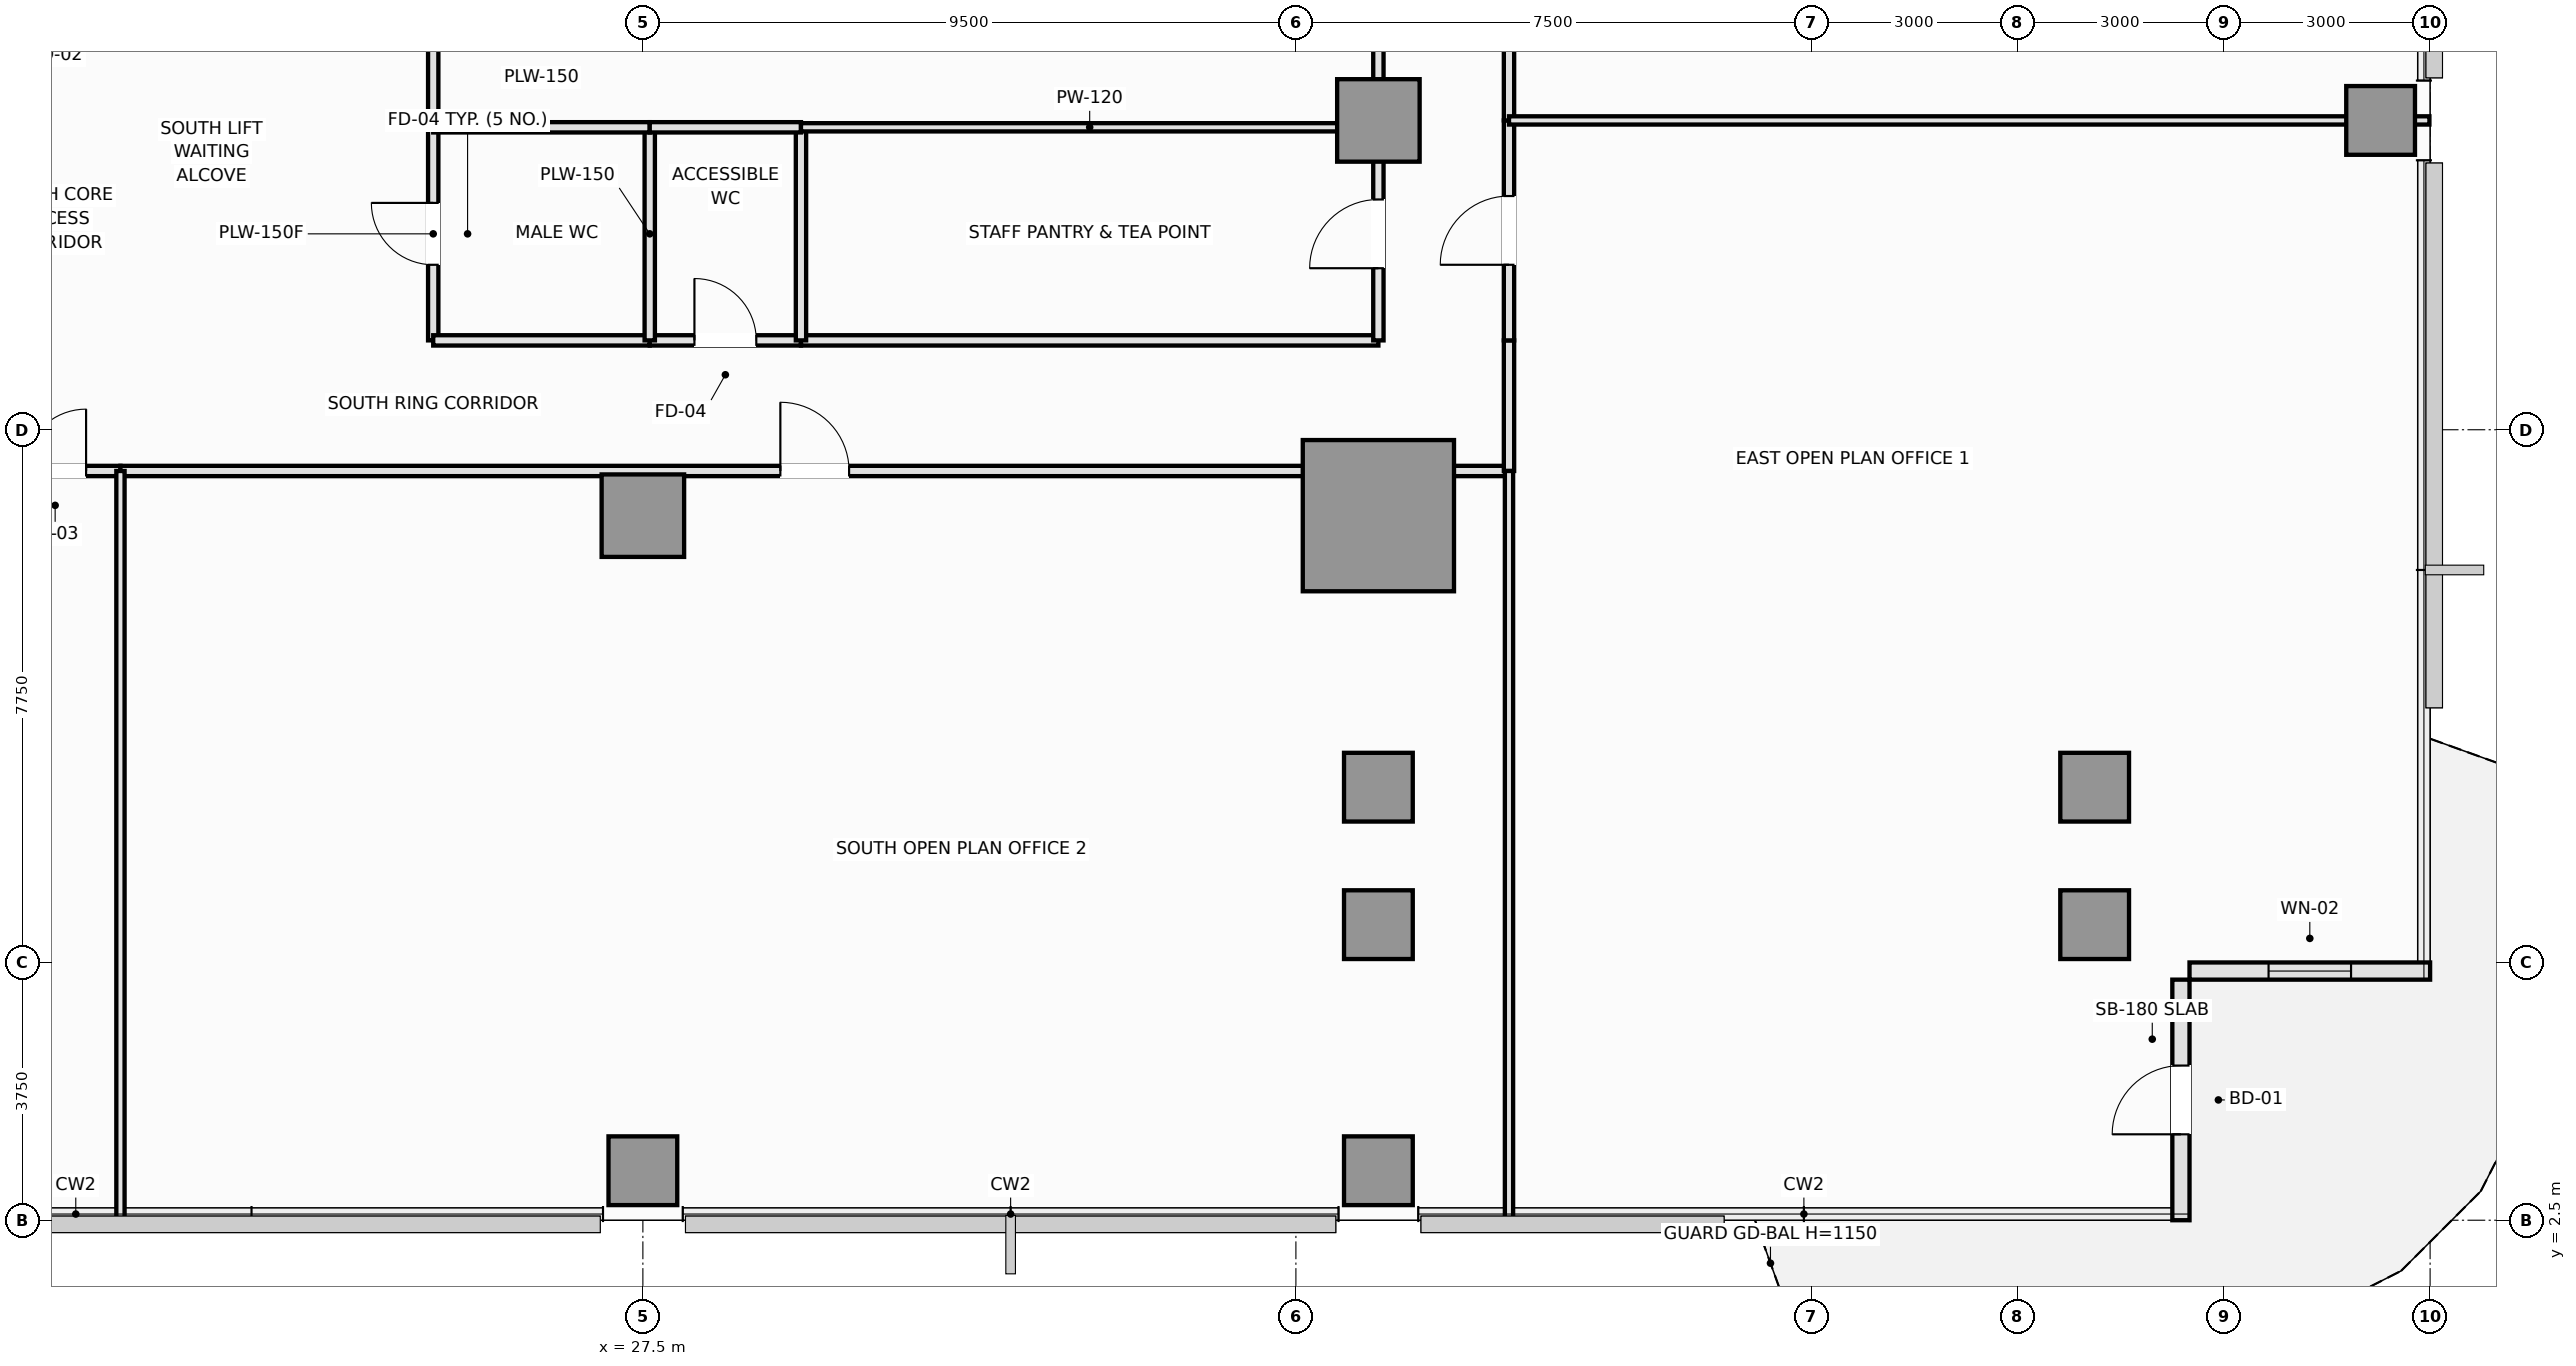
"""IFC4 building model, lengths in metres.
Left out: names, types, materials, properties, quantities, classifications, styles, units other than length and angle.
Written with IfcOpenShell. Run it as: python <this file> out.ifc"""

import sys

from ifc_helpers import new_model, si_unit, direction, frame, frame_2d, origin, origin_2d, place, context, subcontext, project, spatial, rectangle, extrude, element, fill, save


model = new_model("IFC4")
c1 = context("Model", 3, precision=1e-05, world=origin(), true_north=direction((0.0, 1.0)))
c2 = subcontext(c1, "Body", "Model", "MODEL_VIEW")
j1 = project(units=[si_unit("LENGTHUNIT", "METRE"), si_unit("PLANEANGLEUNIT", "RADIAN")], contexts=[c1])
p1 = place(None, origin())
s1 = spatial("IfcSite", under=j1, at=p1, CompositionType="ELEMENT")
p2 = place(p1, origin())
s2 = spatial("IfcBuilding", under=s1, at=p2, CompositionType="ELEMENT")
p3 = place(p2, frame((0.0, 0.0, 54.0)))
s3 = spatial("IfcBuildingStorey", under=s2, at=p3, CompositionType="ELEMENT", Elevation=54.0)
p4 = place(p3, frame((38.2, 12.75, 0.0), z_axis=(0.0, 0.0, 1.0), x_axis=(1.0, 0.0, 0.0)))
e1 = element("IfcColumn", 1, at=p4, inside=s3, PredefinedType="COLUMN", context=c2, shape_type="SweptSolid", body=[
    extrude(rectangle(XDim=2.2, YDim=2.2, at=origin_2d()), origin(), (0.0, 0.0, 1.0), 3.55),
])
for number, where, z_axis, x_axis in (
    (2, (27.5, 12.75, 0.0), (0.0, 0.0, 1.0), (1.0, 0.0, 0.0)),
    (3, (38.2, 18.5, 0.0), (0.0, 0.0, 1.0), (1.0, 0.0, 0.0)),
):
    element("IfcColumn", number, at=place(p3, frame(where, z_axis=z_axis, x_axis=x_axis)), inside=s3, PredefinedType="COLUMN", context=c2, shape_type="SweptSolid", body=[
        extrude(rectangle(XDim=1.2, YDim=1.2, at=origin_2d()), origin(), (0.0, 0.0, 1.0), 3.55),
    ])
for number, where, z_axis, x_axis in (
    (4, (48.62, 6.8, 0.0), (0.0, 0.0, 1.0), (1.0, 0.0, 0.0)),
    (5, (38.2, 6.8, 0.0), (0.0, 0.0, 1.0), (1.0, 0.0, 0.0)),
    (6, (38.2, 8.8, 0.0), (0.0, 0.0, 1.0), (1.0, 0.0, 0.0)),
    (7, (48.62, 8.8, 0.0), (0.0, 0.0, 1.0), (1.0, 0.0, 0.0)),
    (8, (52.78, 18.5, 0.0), (0.0, 0.0, 1.0), (1.0, 0.0, 0.0)),
    (9, (27.5, 3.22, 0.0), (0.0, 0.0, 1.0), (1.0, 0.0, 0.0)),
    (10, (38.2, 3.22, 0.0), (0.0, 0.0, 1.0), (1.0, 0.0, 0.0)),
):
    element("IfcColumn", number, at=place(p3, frame(where, z_axis=z_axis, x_axis=x_axis)), inside=s3, PredefinedType="COLUMN", context=c2, shape_type="SweptSolid", body=[
        extrude(rectangle(XDim=1.0, YDim=1.0, at=origin_2d()), origin(), (0.0, 0.0, 1.0), 3.55),
    ])
p5 = place(p3, frame((49.875, 2.5, 0.0), z_axis=(0.0, 0.0, 1.0), x_axis=(0.0, 1.0, 0.0)))
e11 = element("IfcWall", 11, at=p5, inside=s3, PredefinedType="SOLIDWALL", context=c2, shape_type="SweptSolid", body=[
    extrude(rectangle(XDim=3.5, YDim=0.25, at=frame_2d((1.75, 0.0))), origin(), (0.0, 0.0, 1.0), 3.07),
])
p6 = place(p5, frame((1.25, 0.0, 0.0)))
e12 = element("IfcOpeningElement", 12, at=p6, cuts=e11, PredefinedType="OPENING", context=c2, shape_type="SweptSolid", body=[
    extrude(rectangle(XDim=1.0, YDim=2.2, at=frame_2d((0.5, 1.1))), frame((0.0, 0.135, 0.0), z_axis=(0.0, -1.0, 0.0), x_axis=(1.0, 0.0, 0.0)), (0.0, 0.0, 1.0), 0.27),
])
p7 = place(p3, frame((50.0, 6.125, 0.0), z_axis=(0.0, 0.0, 1.0), x_axis=(1.0, 0.0, 0.0)))
e13 = element("IfcWall", 13, at=p7, inside=s3, PredefinedType="SOLIDWALL", context=c2, shape_type="SweptSolid", body=[
    extrude(rectangle(XDim=3.5, YDim=0.25, at=frame_2d((1.75, 0.0))), origin(), (0.0, 0.0, 1.0), 3.07),
])
p8 = place(p7, frame((1.15, 0.0, 0.9)))
e14 = element("IfcOpeningElement", 14, at=p8, cuts=e13, PredefinedType="OPENING", context=c2, shape_type="SweptSolid", body=[
    extrude(rectangle(XDim=1.2, YDim=1.8, at=frame_2d((0.6, 0.9))), frame((0.0, 0.135, 0.0), z_axis=(0.0, -1.0, 0.0), x_axis=(1.0, 0.0, 0.0)), (0.0, 0.0, 1.0), 0.27),
])
p9 = place(p3, frame((24.45, 15.3, 0.0), z_axis=(0.0, 0.0, 1.0), x_axis=(0.0, 1.0, 0.0)))
e15 = element("IfcWall", 15, at=p9, inside=s3, PredefinedType="PLUMBINGWALL", context=c2, shape_type="SweptSolid", body=[
    extrude(rectangle(XDim=3.1, YDim=0.15, at=frame_2d((1.55, 0.0))), origin(), (0.0, 0.0, 1.0), 3.37),
])
p10 = place(p9, frame((1.1, 0.0, 0.0)))
e16 = element("IfcOpeningElement", 16, at=p10, cuts=e15, PredefinedType="OPENING", context=c2, shape_type="SweptSolid", body=[
    extrude(rectangle(XDim=0.9, YDim=2.1, at=frame_2d((0.45, 1.05))), frame((0.0, 0.085, 0.0), z_axis=(0.0, -1.0, 0.0), x_axis=(1.0, 0.0, 0.0)), (0.0, 0.0, 1.0), 0.17),
])
p11 = place(p3, frame((24.45, 18.4, 0.0), z_axis=(0.0, 0.0, 1.0), x_axis=(0.0, 1.0, 0.0)))
e17 = element("IfcWall", 17, at=p11, inside=s3, PredefinedType="PARTITIONING", context=c2, shape_type="SweptSolid", body=[
    extrude(rectangle(XDim=6.85, YDim=0.15, at=frame_2d((3.425, 0.0))), origin(), (0.0, 0.0, 1.0), 3.37),
])
p12 = place(p11, frame((2.925, 0.0, 0.0)))
e18 = element("IfcOpeningElement", 18, at=p12, cuts=e17, PredefinedType="OPENING", context=c2, shape_type="SweptSolid", body=[
    extrude(rectangle(XDim=1.0, YDim=2.15, at=frame_2d((0.5, 1.075))), frame((0.0, 0.085, 0.0), z_axis=(0.0, -1.0, 0.0), x_axis=(1.0, 0.0, 0.0)), (0.0, 0.0, 1.0), 0.17),
])
p13 = place(p3, frame((24.45, 15.3, 0.0), z_axis=(0.0, 0.0, 1.0), x_axis=(1.0, 0.0, 0.0)))
e19 = element("IfcWall", 19, at=p13, inside=s3, PredefinedType="PLUMBINGWALL", context=c2, shape_type="SweptSolid", body=[
    extrude(rectangle(XDim=3.15, YDim=0.15, at=frame_2d((1.575, 0.0))), origin(), (0.0, 0.0, 1.0), 3.37),
])
p14 = place(p3, frame((27.6, 15.3, 0.0), z_axis=(0.0, 0.0, 1.0), x_axis=(1.0, 0.0, 0.0)))
e20 = element("IfcWall", 20, at=p14, inside=s3, PredefinedType="PLUMBINGWALL", context=c2, shape_type="SweptSolid", body=[
    extrude(rectangle(XDim=2.2, YDim=0.15, at=frame_2d((1.1, 0.0))), origin(), (0.0, 0.0, 1.0), 3.37),
])
p15 = place(p14, frame((0.65, 0.0, 0.0)))
e21 = element("IfcOpeningElement", 21, at=p15, cuts=e20, PredefinedType="OPENING", context=c2, shape_type="SweptSolid", body=[
    extrude(rectangle(XDim=0.9, YDim=2.1, at=frame_2d((0.45, 1.05))), frame((0.0, 0.085, 0.0), z_axis=(0.0, -1.0, 0.0), x_axis=(1.0, 0.0, 0.0)), (0.0, 0.0, 1.0), 0.17),
])
p16 = place(p3, frame((29.8, 15.3, 0.0), z_axis=(0.0, 0.0, 1.0), x_axis=(1.0, 0.0, 0.0)))
e22 = element("IfcWall", 22, at=p16, inside=s3, PredefinedType="PARTITIONING", context=c2, shape_type="SweptSolid", body=[
    extrude(rectangle(XDim=8.4, YDim=0.15, at=frame_2d((4.2, 0.0))), origin(), (0.0, 0.0, 1.0), 3.37),
])
p17 = place(p3, frame((18.0, 13.4, 0.0), z_axis=(0.0, 0.0, 1.0), x_axis=(1.0, 0.0, 0.0)))
e23 = element("IfcWall", 23, at=p17, inside=s3, PredefinedType="PARTITIONING", context=c2, shape_type="SweptSolid", body=[
    extrude(rectangle(XDim=1.9, YDim=0.15, at=frame_2d((0.95, 0.0))), origin(), (0.0, 0.0, 1.0), 3.37),
])
p18 = place(p17, frame((0.5, 0.0, 0.0)))
e24 = element("IfcOpeningElement", 24, at=p18, cuts=e23, PredefinedType="OPENING", context=c2, shape_type="SweptSolid", body=[
    extrude(rectangle(XDim=0.9, YDim=2.1, at=frame_2d((0.45, 1.05))), frame((0.0, 0.085, 0.0), z_axis=(0.0, -1.0, 0.0), x_axis=(1.0, 0.0, 0.0)), (0.0, 0.0, 1.0), 0.17),
])
p19 = place(p3, frame((19.9, 13.4, 0.0), z_axis=(0.0, 0.0, 1.0), x_axis=(1.0, 0.0, 0.0)))
e25 = element("IfcWall", 25, at=p19, inside=s3, PredefinedType="PARTITIONING", context=c2, shape_type="SweptSolid", body=[
    extrude(rectangle(XDim=20.2, YDim=0.15, at=frame_2d((10.1, 0.0))), origin(), (0.0, 0.0, 1.0), 3.37),
])
p20 = place(p19, frame((9.6, 0.0, 0.0)))
e26 = element("IfcOpeningElement", 26, at=p20, cuts=e25, PredefinedType="OPENING", context=c2, shape_type="SweptSolid", body=[
    extrude(rectangle(XDim=1.0, YDim=2.15, at=frame_2d((0.5, 1.075))), frame((0.0, 0.085, 0.0), z_axis=(0.0, -1.0, 0.0), x_axis=(1.0, 0.0, 0.0)), (0.0, 0.0, 1.0), 0.17),
])
p21 = place(p3, frame((40.1, 13.4, 0.0), z_axis=(0.0, 0.0, 1.0), x_axis=(0.0, 1.0, 0.0)))
e27 = element("IfcWall", 27, at=p21, inside=s3, PredefinedType="PARTITIONING", context=c2, shape_type="SweptSolid", body=[
    extrude(rectangle(XDim=1.9, YDim=0.15, at=frame_2d((0.95, 0.0))), origin(), (0.0, 0.0, 1.0), 3.37),
])
p22 = place(p3, frame((38.2, 15.3, 0.0), z_axis=(0.0, 0.0, 1.0), x_axis=(0.0, 1.0, 0.0)))
e28 = element("IfcWall", 28, at=p22, inside=s3, PredefinedType="PARTITIONING", context=c2, shape_type="SweptSolid", body=[
    extrude(rectangle(XDim=3.1, YDim=0.15, at=frame_2d((1.55, 0.0))), origin(), (0.0, 0.0, 1.0), 2.82),
])
p23 = place(p22, frame((1.05, 0.0, 0.0)))
e29 = element("IfcOpeningElement", 29, at=p23, cuts=e28, PredefinedType="OPENING", context=c2, shape_type="SweptSolid", body=[
    extrude(rectangle(XDim=1.0, YDim=2.15, at=frame_2d((0.5, 1.075))), frame((0.0, 0.085, 0.0), z_axis=(0.0, -1.0, 0.0), x_axis=(1.0, 0.0, 0.0)), (0.0, 0.0, 1.0), 0.17),
])
p24 = place(p3, frame((38.2, 18.4, 0.0), z_axis=(0.0, 0.0, 1.0), x_axis=(0.0, 1.0, 0.0)))
e30 = element("IfcWall", 30, at=p24, inside=s3, PredefinedType="PARTITIONING", context=c2, shape_type="SweptSolid", body=[
    extrude(rectangle(XDim=6.85, YDim=0.15, at=frame_2d((3.425, 0.0))), origin(), (0.0, 0.0, 1.0), 2.82),
])
p25 = place(p3, frame((40.1, 15.3, 0.0), z_axis=(0.0, 0.0, 1.0), x_axis=(0.0, 1.0, 0.0)))
e31 = element("IfcWall", 31, at=p25, inside=s3, PredefinedType="PARTITIONING", context=c2, shape_type="SweptSolid", body=[
    extrude(rectangle(XDim=3.2, YDim=0.15, at=frame_2d((1.6, 0.0))), origin(), (0.0, 0.0, 1.0), 3.37),
])
p26 = place(p25, frame((1.1, 0.0, 0.0)))
e32 = element("IfcOpeningElement", 32, at=p26, cuts=e31, PredefinedType="OPENING", context=c2, shape_type="SweptSolid", body=[
    extrude(rectangle(XDim=1.0, YDim=2.15, at=frame_2d((0.5, 1.075))), frame((0.0, 0.085, 0.0), z_axis=(0.0, -1.0, 0.0), x_axis=(1.0, 0.0, 0.0)), (0.0, 0.0, 1.0), 0.17),
])
p27 = place(p3, frame((40.1, 18.5, 0.0), z_axis=(0.0, 0.0, 1.0), x_axis=(0.0, 1.0, 0.0)))
e33 = element("IfcWall", 33, at=p27, inside=s3, PredefinedType="PARTITIONING", context=c2, shape_type="SweptSolid", body=[
    extrude(rectangle(XDim=13.5, YDim=0.15, at=frame_2d((6.75, 0.0))), origin(), (0.0, 0.0, 1.0), 3.37),
])
p28 = place(p27, frame((4.826, 0.0, 0.0)))
e34 = element("IfcOpeningElement", 34, at=p28, cuts=e33, PredefinedType="OPENING", context=c2, shape_type="SweptSolid", body=[
    extrude(rectangle(XDim=1.0, YDim=2.15, at=frame_2d((0.5, 1.075))), frame((0.0, 0.085, 0.0), z_axis=(0.0, -1.0, 0.0), x_axis=(1.0, 0.0, 0.0)), (0.0, 0.0, 1.0), 0.17),
])
p29 = place(p3, frame((27.6, 15.3, 0.0), z_axis=(0.0, 0.0, 1.0), x_axis=(0.0, 1.0, 0.0)))
e35 = element("IfcWall", 35, at=p29, inside=s3, PredefinedType="PLUMBINGWALL", context=c2, shape_type="SweptSolid", body=[
    extrude(rectangle(XDim=3.1, YDim=0.15, at=frame_2d((1.55, 0.0))), origin(), (0.0, 0.0, 1.0), 3.37),
])
p30 = place(p3, frame((24.45, 18.4, 0.0), z_axis=(0.0, 0.0, 1.0), x_axis=(1.0, 0.0, 0.0)))
e36 = element("IfcWall", 36, at=p30, inside=s3, PredefinedType="PLUMBINGWALL", context=c2, shape_type="SweptSolid", body=[
    extrude(rectangle(XDim=3.15, YDim=0.15, at=frame_2d((1.575, 0.0))), origin(), (0.0, 0.0, 1.0), 2.72),
])
p31 = place(p3, frame((29.8, 15.3, 0.0), z_axis=(0.0, 0.0, 1.0), x_axis=(0.0, 1.0, 0.0)))
e37 = element("IfcWall", 37, at=p31, inside=s3, PredefinedType="PLUMBINGWALL", context=c2, shape_type="SweptSolid", body=[
    extrude(rectangle(XDim=3.1, YDim=0.15, at=frame_2d((1.55, 0.0))), origin(), (0.0, 0.0, 1.0), 3.37),
])
p32 = place(p3, frame((27.6, 18.4, 0.0), z_axis=(0.0, 0.0, 1.0), x_axis=(1.0, 0.0, 0.0)))
e38 = element("IfcWall", 38, at=p32, inside=s3, PredefinedType="PLUMBINGWALL", context=c2, shape_type="SweptSolid", body=[
    extrude(rectangle(XDim=2.2, YDim=0.15, at=frame_2d((1.1, 0.0))), origin(), (0.0, 0.0, 1.0), 2.72),
])
p33 = place(p3, frame((29.8, 18.4, 0.0), z_axis=(0.0, 0.0, 1.0), x_axis=(1.0, 0.0, 0.0)))
e39 = element("IfcWall", 39, at=p33, inside=s3, PredefinedType="PARTITIONING", context=c2, shape_type="SweptSolid", body=[
    extrude(rectangle(XDim=8.4, YDim=0.12, at=frame_2d((4.2, 0.0))), origin(), (0.0, 0.0, 1.0), 2.72),
])
for number, where, z_axis, x_axis in (
    (40, (19.9, 2.51, 0.0), (0.0, 0.0, 1.0), (0.0, 1.0, 0.0)),
    (41, (40.1, 2.51, 0.0), (0.0, 0.0, 1.0), (0.0, 1.0, 0.0)),
):
    element("IfcWall", number, at=place(p3, frame(where, z_axis=z_axis, x_axis=x_axis)), inside=s3, PredefinedType="PARTITIONING", context=c2, shape_type="SweptSolid", body=[
        extrude(rectangle(XDim=10.89, YDim=0.12, at=frame_2d((5.445, 0.0))), origin(), (0.0, 0.0, 1.0), 3.37),
    ])
p34 = place(p3, frame((40.1, 18.5, 0.0), z_axis=(0.0, 0.0, 1.0), x_axis=(1.0, 0.0, 0.0)))
e42 = element("IfcWall", 42, at=p34, inside=s3, PredefinedType="PARTITIONING", context=c2, shape_type="SweptSolid", body=[
    extrude(rectangle(XDim=13.39, YDim=0.12, at=frame_2d((6.695, 0.0))), origin(), (0.0, 0.0, 1.0), 2.72),
])
p35 = place(p6, frame((1.0, 0.0, 0.0), z_axis=(0.0, 0.0, 1.0), x_axis=(-1.0, 0.0, 0.0)))
e43 = element("IfcDoor", 43, at=p35, inside=s3, OperationType="SINGLE_SWING_LEFT", PredefinedType="DOOR", context=c2, shape_type="SweptSolid", body=[
    extrude(rectangle(XDim=1.0, YDim=2.2, at=frame_2d((0.5, 1.1))), frame((0.0, 0.025, 0.0), z_axis=(0.0, -1.0, 0.0), x_axis=(1.0, 0.0, 0.0)), (0.0, 0.0, 1.0), 0.05),
])
fill(e12, e43)
p36 = place(p8, origin())
e44 = element("IfcWindow", 44, at=p36, inside=s3, PartitioningType="SINGLE_PANEL", PredefinedType="WINDOW", context=c2, shape_type="SweptSolid", body=[
    extrude(rectangle(XDim=1.2, YDim=1.8, at=frame_2d((0.6, 0.9))), frame((0.0, 0.03, 0.0), z_axis=(0.0, -1.0, 0.0), x_axis=(1.0, 0.0, 0.0)), (0.0, 0.0, 1.0), 0.06),
])
fill(e14, e44)
p37 = place(p10, origin())
e45 = element("IfcDoor", 45, at=p37, inside=s3, OperationType="SINGLE_SWING_RIGHT", PredefinedType="DOOR", context=c2, shape_type="SweptSolid", body=[
    extrude(rectangle(XDim=0.9, YDim=2.1, at=frame_2d((0.45, 1.05))), frame((0.0, 0.025, 0.0), z_axis=(0.0, -1.0, 0.0), x_axis=(1.0, 0.0, 0.0)), (0.0, 0.0, 1.0), 0.05),
])
fill(e16, e45)
p38 = place(p15, origin())
e46 = element("IfcDoor", 46, at=p38, inside=s3, OperationType="SINGLE_SWING_LEFT", PredefinedType="DOOR", context=c2, shape_type="SweptSolid", body=[
    extrude(rectangle(XDim=0.9, YDim=2.1, at=frame_2d((0.45, 1.05))), frame((0.0, 0.025, 0.0), z_axis=(0.0, -1.0, 0.0), x_axis=(1.0, 0.0, 0.0)), (0.0, 0.0, 1.0), 0.05),
])
fill(e21, e46)
p39 = place(p18, origin())
e47 = element("IfcDoor", 47, at=p39, inside=s3, OperationType="SINGLE_SWING_RIGHT", PredefinedType="DOOR", context=c2, shape_type="SweptSolid", body=[
    extrude(rectangle(XDim=0.9, YDim=2.1, at=frame_2d((0.45, 1.05))), frame((0.0, 0.025, 0.0), z_axis=(0.0, -1.0, 0.0), x_axis=(1.0, 0.0, 0.0)), (0.0, 0.0, 1.0), 0.05),
])
fill(e24, e47)
p40 = place(p20, origin())
e48 = element("IfcDoor", 48, at=p40, inside=s3, OperationType="SINGLE_SWING_LEFT", PredefinedType="DOOR", context=c2, shape_type="SweptSolid", body=[
    extrude(rectangle(XDim=1.0, YDim=2.15, at=frame_2d((0.5, 1.075))), frame((0.0, 0.025, 0.0), z_axis=(0.0, -1.0, 0.0), x_axis=(1.0, 0.0, 0.0)), (0.0, 0.0, 1.0), 0.05),
])
fill(e26, e48)
p41 = place(p23, origin())
e49 = element("IfcDoor", 49, at=p41, inside=s3, OperationType="SINGLE_SWING_LEFT", PredefinedType="DOOR", context=c2, shape_type="SweptSolid", body=[
    extrude(rectangle(XDim=1.0, YDim=2.15, at=frame_2d((0.5, 1.075))), frame((0.0, 0.025, 0.0), z_axis=(0.0, -1.0, 0.0), x_axis=(1.0, 0.0, 0.0)), (0.0, 0.0, 1.0), 0.05),
])
fill(e29, e49)
p42 = place(p26, origin())
e50 = element("IfcDoor", 50, at=p42, inside=s3, OperationType="SINGLE_SWING_LEFT", PredefinedType="DOOR", context=c2, shape_type="SweptSolid", body=[
    extrude(rectangle(XDim=1.0, YDim=2.15, at=frame_2d((0.5, 1.075))), frame((0.0, 0.025, 0.0), z_axis=(0.0, -1.0, 0.0), x_axis=(1.0, 0.0, 0.0)), (0.0, 0.0, 1.0), 0.05),
])
fill(e32, e50)
save(model, sys.argv[1])
